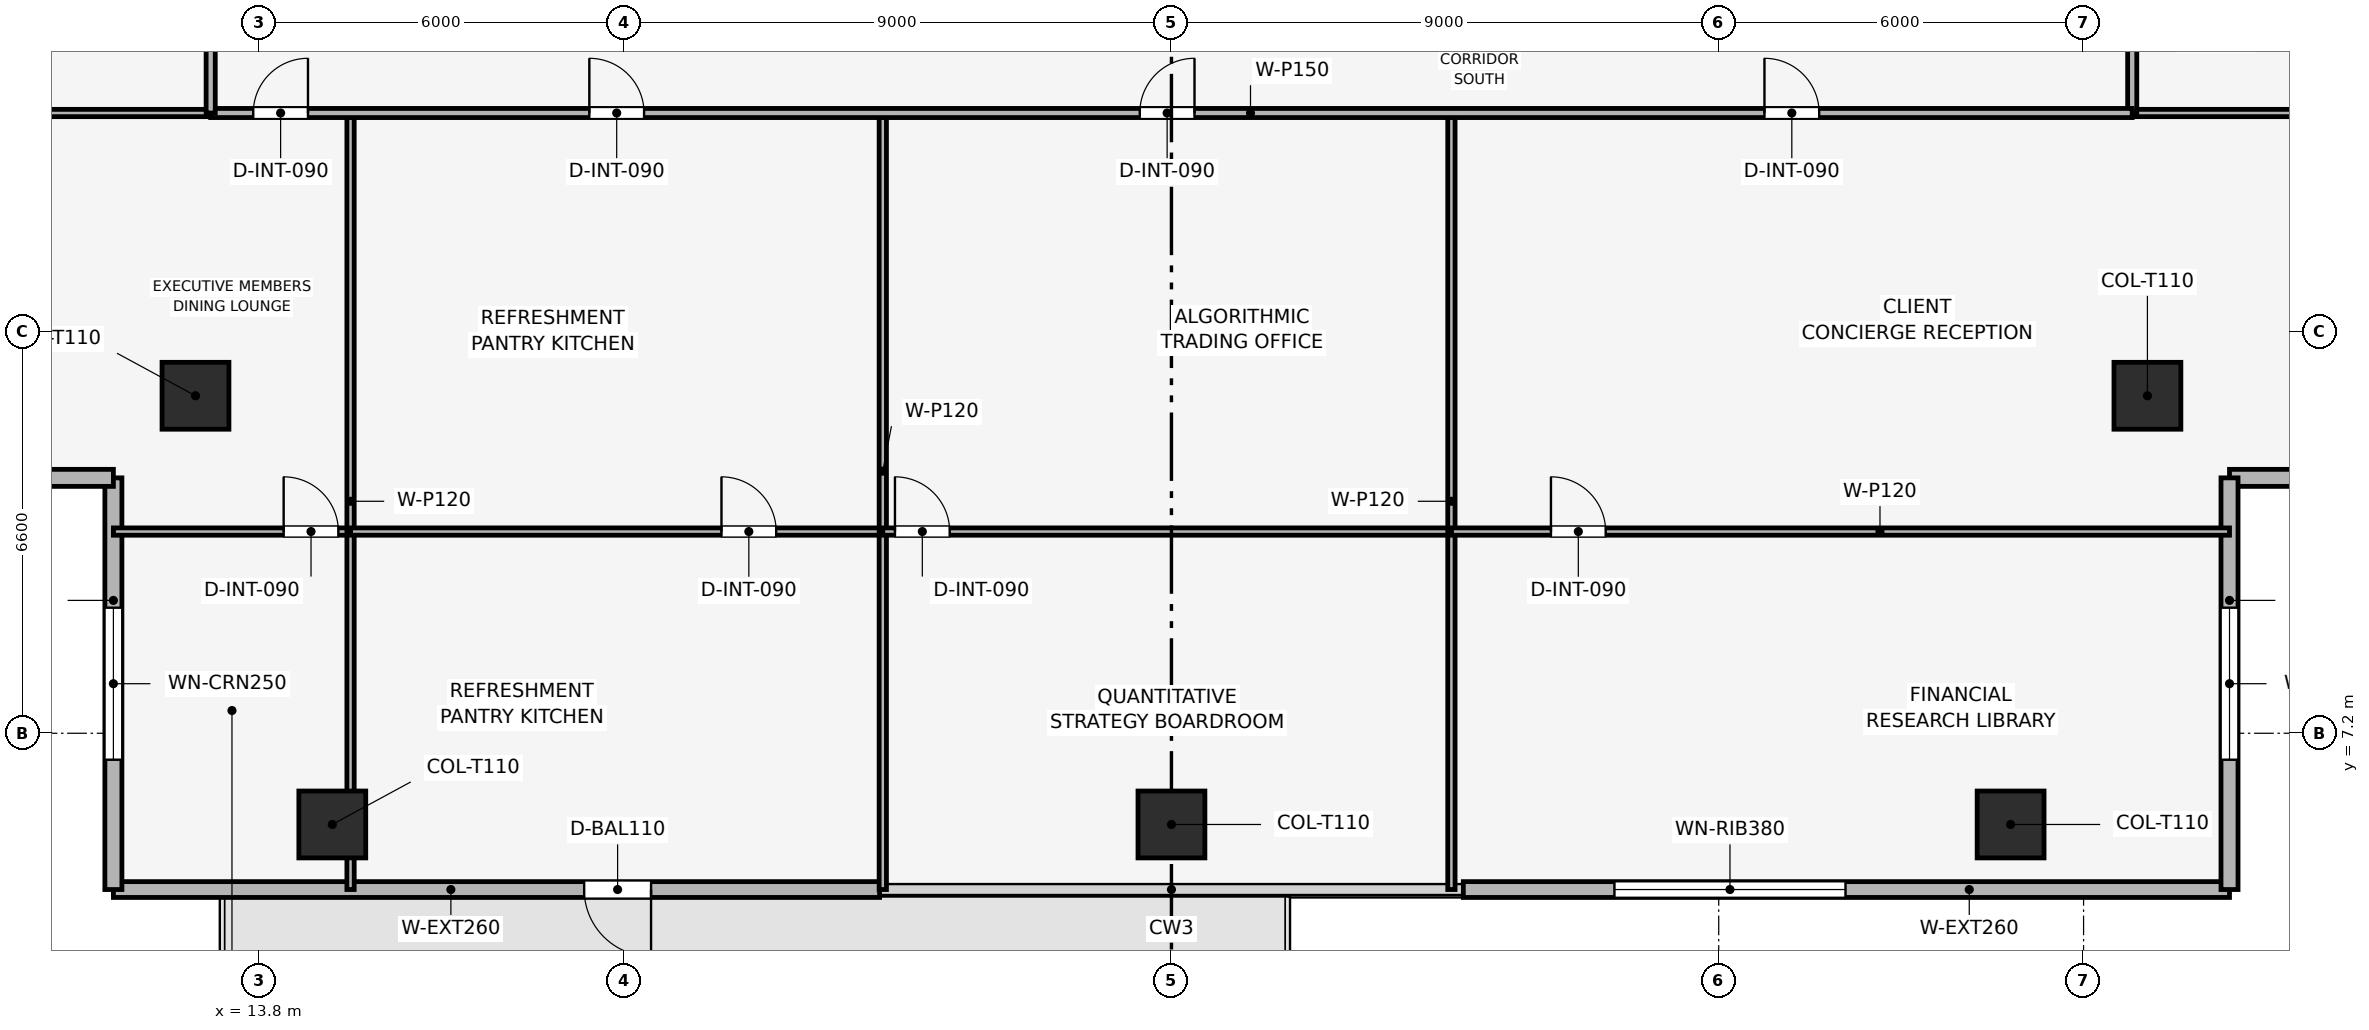
"""IFC4 building model, lengths in metres.
Left out: names, types, materials, properties, quantities, classifications, styles, units other than length and angle.
Written with IfcOpenShell. Run it as: python <this file> out.ifc"""

import sys

from ifc_helpers import new_model, si_unit, direction, frame, frame_2d, origin, origin_2d, place, context, subcontext, project, spatial, rectangle, extrude, element, fill, save


model = new_model("IFC4")
c1 = context("Model", 3, precision=1e-05, world=origin(), true_north=direction((0.0, 1.0)))
c2 = subcontext(c1, "Body", "Model", "MODEL_VIEW")
j1 = project(units=[si_unit("LENGTHUNIT", "METRE"), si_unit("PLANEANGLEUNIT", "RADIAN")], contexts=[c1])
p1 = place(None, origin())
s1 = spatial("IfcSite", under=j1, at=p1, CompositionType="ELEMENT")
p2 = place(p1, origin())
s2 = spatial("IfcBuilding", under=s1, at=p2, CompositionType="ELEMENT")
p3 = place(p2, frame((0.0, 0.0, 149.55)))
s3 = spatial("IfcBuildingStorey", under=s2, at=p3, CompositionType="ELEMENT", Elevation=149.55)
for number, where, z_axis, x_axis in (
    (1, (15.0, 5.7, 0.003), (0.0, 0.0, 1.0), (1.0, 0.0, 0.0)),
    (2, (28.8, 5.7, 0.003), (0.0, 0.0, 1.0), (1.0, 0.0, 0.0)),
    (3, (42.6, 5.7, 0.003), (0.0, 0.0, 1.0), (1.0, 0.0, 0.0)),
    (4, (12.75, 12.75, 0.003), (0.0, 0.0, 1.0), (1.0, 0.0, 0.0)),
    (5, (44.85, 12.75, 0.003), (0.0, 0.0, 1.0), (1.0, 0.0, 0.0)),
):
    element("IfcColumn", number, at=place(p3, frame(where, z_axis=z_axis, x_axis=x_axis)), inside=s3, PredefinedType="COLUMN", context=c2, shape_type="SweptSolid", body=[
        extrude(rectangle(XDim=1.1, YDim=1.1, at=origin_2d()), origin(), (0.0, 0.0, 1.0), 3.489),
    ])
p4 = place(p3, frame((46.2, 4.63, 0.0), z_axis=(0.0, 0.0, 1.0), x_axis=(-1.0, 0.0, 0.0)))
e6 = element("IfcWall", 6, at=p4, inside=s3, PredefinedType="SOLIDWALL", context=c2, shape_type="SweptSolid", body=[
    extrude(rectangle(XDim=12.6, YDim=0.26, at=frame_2d((6.3, 0.0))), origin(), (0.0, 0.0, 1.0), 3.495),
])
p5 = place(p4, frame((6.315, 0.0, 0.9)))
e7 = element("IfcOpeningElement", 7, at=p5, cuts=e6, PredefinedType="OPENING", context=c2, shape_type="SweptSolid", body=[
    extrude(rectangle(XDim=3.8, YDim=1.9, at=frame_2d((1.9, 0.95))), frame((0.0, 0.14, 0.0), z_axis=(0.0, -1.0, 0.0), x_axis=(1.0, 0.0, 0.0)), (0.0, 0.0, 1.0), 0.28),
])
p6 = place(p3, frame((24.0, 4.63, 0.0), z_axis=(0.0, 0.0, 1.0), x_axis=(-1.0, 0.0, 0.0)))
e8 = element("IfcWall", 8, at=p6, inside=s3, PredefinedType="SOLIDWALL", context=c2, shape_type="SweptSolid", body=[
    extrude(rectangle(XDim=12.6, YDim=0.26, at=frame_2d((6.3, 0.0))), origin(), (0.0, 0.0, 1.0), 3.495),
])
p7 = place(p6, frame((3.758, 0.0, 0.0)))
e9 = element("IfcOpeningElement", 9, at=p7, cuts=e8, PredefinedType="OPENING", context=c2, shape_type="SweptSolid", body=[
    extrude(rectangle(XDim=1.1, YDim=2.2, at=frame_2d((0.55, 1.1))), frame((0.0, 0.14, 0.0), z_axis=(0.0, -1.0, 0.0), x_axis=(1.0, 0.0, 0.0)), (0.0, 0.0, 1.0), 0.28),
])
p8 = place(p3, frame((11.4, 4.63, 0.0), z_axis=(0.0, 0.0, 1.0), x_axis=(0.0, 1.0, 0.0)))
e10 = element("IfcWall", 10, at=p8, inside=s3, PredefinedType="SOLIDWALL", context=c2, shape_type="SweptSolid", body=[
    extrude(rectangle(XDim=6.77, YDim=0.28, at=frame_2d((3.385, 0.0))), origin(), (0.0, 0.0, 1.0), 3.495),
])
p9 = place(p8, frame((2.135, 0.0, 0.9)))
e11 = element("IfcOpeningElement", 11, at=p9, cuts=e10, PredefinedType="OPENING", context=c2, shape_type="SweptSolid", body=[
    extrude(rectangle(XDim=2.5, YDim=1.9, at=frame_2d((1.25, 0.95))), frame((0.0, 0.15, 0.0), z_axis=(0.0, -1.0, 0.0), x_axis=(1.0, 0.0, 0.0)), (0.0, 0.0, 1.0), 0.3),
])
p10 = place(p3, frame((11.4, 11.4, 0.0), z_axis=(0.0, 0.0, 1.0), x_axis=(-1.0, 0.0, 0.0)))
e12 = element("IfcWall", 12, at=p10, inside=s3, PredefinedType="SOLIDWALL", context=c2, shape_type="SweptSolid", body=[
    extrude(rectangle(XDim=6.77, YDim=0.28, at=frame_2d((3.385, 0.0))), origin(), (0.0, 0.0, 1.0), 3.495),
])
p11 = place(p10, frame((2.135, 0.0, 0.9)))
e13 = element("IfcOpeningElement", 13, at=p11, cuts=e12, PredefinedType="OPENING", context=c2, shape_type="SweptSolid", body=[
    extrude(rectangle(XDim=2.5, YDim=1.9, at=frame_2d((1.25, 0.95))), frame((0.0, 0.15, 0.0), z_axis=(0.0, -1.0, 0.0), x_axis=(1.0, 0.0, 0.0)), (0.0, 0.0, 1.0), 0.3),
])
p12 = place(p3, frame((52.97, 11.4, 0.0), z_axis=(0.0, 0.0, 1.0), x_axis=(-1.0, 0.0, 0.0)))
e14 = element("IfcWall", 14, at=p12, inside=s3, PredefinedType="SOLIDWALL", context=c2, shape_type="SweptSolid", body=[
    extrude(rectangle(XDim=6.77, YDim=0.28, at=frame_2d((3.385, 0.0))), origin(), (0.0, 0.0, 1.0), 3.495),
])
p13 = place(p12, frame((2.135, 0.0, 0.9)))
e15 = element("IfcOpeningElement", 15, at=p13, cuts=e14, PredefinedType="OPENING", context=c2, shape_type="SweptSolid", body=[
    extrude(rectangle(XDim=2.5, YDim=1.9, at=frame_2d((1.25, 0.95))), frame((0.0, 0.15, 0.0), z_axis=(0.0, -1.0, 0.0), x_axis=(1.0, 0.0, 0.0)), (0.0, 0.0, 1.0), 0.3),
])
p14 = place(p3, frame((46.2, 11.4, 0.0), z_axis=(0.0, 0.0, 1.0), x_axis=(0.0, -1.0, 0.0)))
e16 = element("IfcWall", 16, at=p14, inside=s3, PredefinedType="SOLIDWALL", context=c2, shape_type="SweptSolid", body=[
    extrude(rectangle(XDim=6.77, YDim=0.28, at=frame_2d((3.385, 0.0))), origin(), (0.0, 0.0, 1.0), 3.495),
])
p15 = place(p14, frame((2.135, 0.0, 0.9)))
e17 = element("IfcOpeningElement", 17, at=p15, cuts=e16, PredefinedType="OPENING", context=c2, shape_type="SweptSolid", body=[
    extrude(rectangle(XDim=2.5, YDim=1.9, at=frame_2d((1.25, 0.95))), frame((0.0, 0.15, 0.0), z_axis=(0.0, -1.0, 0.0), x_axis=(1.0, 0.0, 0.0)), (0.0, 0.0, 1.0), 0.3),
])
p16 = place(p3, frame((11.4, 10.517, 0.0), z_axis=(0.0, 0.0, 1.0), x_axis=(1.0, 0.0, 0.0)))
e18 = element("IfcWall", 18, at=p16, inside=s3, PredefinedType="PARTITIONING", context=c2, shape_type="SweptSolid", body=[
    extrude(rectangle(XDim=3.9, YDim=0.12, at=frame_2d((1.95, 0.0))), origin(), (0.0, 0.0, 1.0), 2.98),
])
p17 = place(p16, frame((2.8, 0.0, 0.0)))
e19 = element("IfcOpeningElement", 19, at=p17, cuts=e18, PredefinedType="OPENING", context=c2, shape_type="SweptSolid", body=[
    extrude(rectangle(XDim=0.9, YDim=2.1, at=frame_2d((0.45, 1.05))), frame((0.0, 0.07, 0.0), z_axis=(0.0, -1.0, 0.0), x_axis=(1.0, 0.0, 0.0)), (0.0, 0.0, 1.0), 0.14),
])
p18 = place(p3, frame((15.3, 4.63, 0.0), z_axis=(0.0, 0.0, 1.0), x_axis=(0.0, 1.0, 0.0)))
e20 = element("IfcWall", 20, at=p18, inside=s3, PredefinedType="PARTITIONING", context=c2, shape_type="SweptSolid", body=[
    extrude(rectangle(XDim=12.77, YDim=0.12, at=frame_2d((6.385, 0.0))), origin(), (0.0, 0.0, 1.0), 2.98),
])
p19 = place(p3, frame((15.3, 10.517, 0.0), z_axis=(0.0, 0.0, 1.0), x_axis=(1.0, 0.0, 0.0)))
e21 = element("IfcWall", 21, at=p19, inside=s3, PredefinedType="PARTITIONING", context=c2, shape_type="SweptSolid", body=[
    extrude(rectangle(XDim=8.753, YDim=0.12, at=frame_2d((4.376, 0.0))), origin(), (0.0, 0.0, 1.0), 3.03),
])
p20 = place(p19, frame((6.1, 0.0, 0.0)))
e22 = element("IfcOpeningElement", 22, at=p20, cuts=e21, PredefinedType="OPENING", context=c2, shape_type="SweptSolid", body=[
    extrude(rectangle(XDim=0.9, YDim=2.1, at=frame_2d((0.45, 1.05))), frame((0.0, 0.07, 0.0), z_axis=(0.0, -1.0, 0.0), x_axis=(1.0, 0.0, 0.0)), (0.0, 0.0, 1.0), 0.14),
])
p21 = place(p3, frame((24.053, 4.63, 0.0), z_axis=(0.0, 0.0, 1.0), x_axis=(0.0, 1.0, 0.0)))
e23 = element("IfcWall", 23, at=p21, inside=s3, PredefinedType="PARTITIONING", context=c2, shape_type="SweptSolid", body=[
    extrude(rectangle(XDim=12.77, YDim=0.12, at=frame_2d((6.385, 0.0))), origin(), (0.0, 0.0, 1.0), 2.98),
])
p22 = place(p3, frame((24.053, 10.517, 0.0), z_axis=(0.0, 0.0, 1.0), x_axis=(1.0, 0.0, 0.0)))
e24 = element("IfcWall", 24, at=p22, inside=s3, PredefinedType="PARTITIONING", context=c2, shape_type="SweptSolid", body=[
    extrude(rectangle(XDim=9.351, YDim=0.12, at=frame_2d((4.676, 0.0))), origin(), (0.0, 0.0, 1.0), 3.03),
])
p23 = place(p22, frame((0.2, 0.0, 0.0)))
e25 = element("IfcOpeningElement", 25, at=p23, cuts=e24, PredefinedType="OPENING", context=c2, shape_type="SweptSolid", body=[
    extrude(rectangle(XDim=0.9, YDim=2.1, at=frame_2d((0.45, 1.05))), frame((0.0, 0.07, 0.0), z_axis=(0.0, -1.0, 0.0), x_axis=(1.0, 0.0, 0.0)), (0.0, 0.0, 1.0), 0.14),
])
p24 = place(p3, frame((33.404, 4.63, 0.0), z_axis=(0.0, 0.0, 1.0), x_axis=(0.0, 1.0, 0.0)))
e26 = element("IfcWall", 26, at=p24, inside=s3, PredefinedType="PARTITIONING", context=c2, shape_type="SweptSolid", body=[
    extrude(rectangle(XDim=12.77, YDim=0.12, at=frame_2d((6.385, 0.0))), origin(), (0.0, 0.0, 1.0), 2.98),
])
p25 = place(p3, frame((33.404, 10.517, 0.0), z_axis=(0.0, 0.0, 1.0), x_axis=(1.0, 0.0, 0.0)))
e27 = element("IfcWall", 27, at=p25, inside=s3, PredefinedType="PARTITIONING", context=c2, shape_type="SweptSolid", body=[
    extrude(rectangle(XDim=12.796, YDim=0.12, at=frame_2d((6.398, 0.0))), origin(), (0.0, 0.0, 1.0), 2.98),
])
p26 = place(p25, frame((1.637, 0.0, 0.0)))
e28 = element("IfcOpeningElement", 28, at=p26, cuts=e27, PredefinedType="OPENING", context=c2, shape_type="SweptSolid", body=[
    extrude(rectangle(XDim=0.9, YDim=2.1, at=frame_2d((0.45, 1.05))), frame((0.0, 0.07, 0.0), z_axis=(0.0, -1.0, 0.0), x_axis=(1.0, 0.0, 0.0)), (0.0, 0.0, 1.0), 0.14),
])
p27 = place(p3, frame((4.63, 17.4, 0.0), z_axis=(0.0, 0.0, 1.0), x_axis=(1.0, 0.0, 0.0)))
e29 = element("IfcWall", 29, at=p27, inside=s3, PredefinedType="PARTITIONING", context=c2, shape_type="SweptSolid", body=[
    extrude(rectangle(XDim=8.37, YDim=0.12, at=frame_2d((4.185, 0.0))), origin(), (0.0, 0.0, 1.0), 2.98),
])
p28 = place(p3, frame((44.6, 17.4, 0.0), z_axis=(0.0, 0.0, 1.0), x_axis=(1.0, 0.0, 0.0)))
e30 = element("IfcWall", 30, at=p28, inside=s3, PredefinedType="PARTITIONING", context=c2, shape_type="SweptSolid", body=[
    extrude(rectangle(XDim=8.37, YDim=0.12, at=frame_2d((4.185, 0.0))), origin(), (0.0, 0.0, 1.0), 2.98),
])
p29 = place(p3, frame((44.6, 17.4, 0.0), z_axis=(0.0, 0.0, 1.0), x_axis=(0.0, 1.0, 0.0)))
e31 = element("IfcWall", 31, at=p29, inside=s3, PredefinedType="PARTITIONING", context=c2, shape_type="SweptSolid", body=[
    extrude(rectangle(XDim=2.4, YDim=0.15, at=frame_2d((1.2, 0.0))), origin(), (0.0, 0.0, 1.0), 3.495),
])
p30 = place(p3, frame((13.0, 17.4, 0.0), z_axis=(0.0, 0.0, 1.0), x_axis=(1.0, 0.0, 0.0)))
e32 = element("IfcWall", 32, at=p30, inside=s3, PredefinedType="PARTITIONING", context=c2, shape_type="SweptSolid", body=[
    extrude(rectangle(XDim=31.6, YDim=0.15, at=frame_2d((15.8, 0.0))), origin(), (0.0, 0.0, 1.0), 3.03),
])
p31 = place(p30, frame((0.7, 0.0, 0.0)))
e33 = element("IfcOpeningElement", 33, at=p31, cuts=e32, PredefinedType="OPENING", context=c2, shape_type="SweptSolid", body=[
    extrude(rectangle(XDim=0.9, YDim=2.1, at=frame_2d((0.45, 1.05))), frame((0.0, 0.085, 0.0), z_axis=(0.0, -1.0, 0.0), x_axis=(1.0, 0.0, 0.0)), (0.0, 0.0, 1.0), 0.17),
])
p32 = place(p30, frame((6.227, 0.0, 0.0)))
e34 = element("IfcOpeningElement", 34, at=p32, cuts=e32, PredefinedType="OPENING", context=c2, shape_type="SweptSolid", body=[
    extrude(rectangle(XDim=0.9, YDim=2.1, at=frame_2d((0.45, 1.05))), frame((0.0, 0.085, 0.0), z_axis=(0.0, -1.0, 0.0), x_axis=(1.0, 0.0, 0.0)), (0.0, 0.0, 1.0), 0.17),
])
p33 = place(p30, frame((15.279, 0.0, 0.0)))
e35 = element("IfcOpeningElement", 35, at=p33, cuts=e32, PredefinedType="OPENING", context=c2, shape_type="SweptSolid", body=[
    extrude(rectangle(XDim=0.9, YDim=2.1, at=frame_2d((0.45, 1.05))), frame((0.0, 0.085, 0.0), z_axis=(0.0, -1.0, 0.0), x_axis=(1.0, 0.0, 0.0)), (0.0, 0.0, 1.0), 0.17),
])
p34 = place(p30, frame((25.552, 0.0, 0.0)))
e36 = element("IfcOpeningElement", 36, at=p34, cuts=e32, PredefinedType="OPENING", context=c2, shape_type="SweptSolid", body=[
    extrude(rectangle(XDim=0.9, YDim=2.1, at=frame_2d((0.45, 1.05))), frame((0.0, 0.085, 0.0), z_axis=(0.0, -1.0, 0.0), x_axis=(1.0, 0.0, 0.0)), (0.0, 0.0, 1.0), 0.17),
])
p35 = place(p3, frame((13.0, 17.4, 0.0), z_axis=(0.0, 0.0, 1.0), x_axis=(0.0, 1.0, 0.0)))
e37 = element("IfcWall", 37, at=p35, inside=s3, PredefinedType="PARTITIONING", context=c2, shape_type="SweptSolid", body=[
    extrude(rectangle(XDim=22.8, YDim=0.15, at=frame_2d((11.4, 0.0))), origin(), (0.0, 0.0, 1.0), 3.03),
])
p36 = place(p35, frame((10.95, 0.0, 0.0)))
e38 = element("IfcOpeningElement", 38, at=p36, cuts=e37, PredefinedType="OPENING", context=c2, shape_type="SweptSolid", body=[
    extrude(rectangle(XDim=0.9, YDim=2.1, at=frame_2d((0.45, 1.05))), frame((0.0, 0.085, 0.0), z_axis=(0.0, -1.0, 0.0), x_axis=(1.0, 0.0, 0.0)), (0.0, 0.0, 1.0), 0.17),
])
p37 = place(p7, origin())
e39 = element("IfcDoor", 39, at=p37, inside=s3, OperationType="SINGLE_SWING_LEFT", PredefinedType="DOOR", context=c2, shape_type="SweptSolid", body=[
    extrude(rectangle(XDim=1.1, YDim=2.2, at=frame_2d((0.55, 1.1))), frame((0.0, 0.025, 0.0), z_axis=(0.0, -1.0, 0.0), x_axis=(1.0, 0.0, 0.0)), (0.0, 0.0, 1.0), 0.05),
])
fill(e9, e39)
p38 = place(p5, origin())
e40 = element("IfcWindow", 40, at=p38, inside=s3, PartitioningType="SINGLE_PANEL", PredefinedType="WINDOW", context=c2, shape_type="SweptSolid", body=[
    extrude(rectangle(XDim=3.8, YDim=1.9, at=frame_2d((1.9, 0.95))), frame((0.0, 0.03, 0.0), z_axis=(0.0, -1.0, 0.0), x_axis=(1.0, 0.0, 0.0)), (0.0, 0.0, 1.0), 0.06),
])
fill(e7, e40)
p39 = place(p9, origin())
e41 = element("IfcWindow", 41, at=p39, inside=s3, PartitioningType="SINGLE_PANEL", PredefinedType="WINDOW", context=c2, shape_type="SweptSolid", body=[
    extrude(rectangle(XDim=2.5, YDim=1.9, at=frame_2d((1.25, 0.95))), frame((0.0, 0.03, 0.0), z_axis=(0.0, -1.0, 0.0), x_axis=(1.0, 0.0, 0.0)), (0.0, 0.0, 1.0), 0.06),
])
fill(e11, e41)
p40 = place(p15, origin())
e42 = element("IfcWindow", 42, at=p40, inside=s3, PartitioningType="SINGLE_PANEL", PredefinedType="WINDOW", context=c2, shape_type="SweptSolid", body=[
    extrude(rectangle(XDim=2.5, YDim=1.9, at=frame_2d((1.25, 0.95))), frame((0.0, 0.03, 0.0), z_axis=(0.0, -1.0, 0.0), x_axis=(1.0, 0.0, 0.0)), (0.0, 0.0, 1.0), 0.06),
])
fill(e17, e42)
p41 = place(p17, origin())
e43 = element("IfcDoor", 43, at=p41, inside=s3, OperationType="SINGLE_SWING_LEFT", PredefinedType="DOOR", context=c2, shape_type="SweptSolid", body=[
    extrude(rectangle(XDim=0.9, YDim=2.1, at=frame_2d((0.45, 1.05))), frame((0.0, 0.025, 0.0), z_axis=(0.0, -1.0, 0.0), x_axis=(1.0, 0.0, 0.0)), (0.0, 0.0, 1.0), 0.05),
])
fill(e19, e43)
p42 = place(p20, origin())
e44 = element("IfcDoor", 44, at=p42, inside=s3, OperationType="SINGLE_SWING_LEFT", PredefinedType="DOOR", context=c2, shape_type="SweptSolid", body=[
    extrude(rectangle(XDim=0.9, YDim=2.1, at=frame_2d((0.45, 1.05))), frame((0.0, 0.025, 0.0), z_axis=(0.0, -1.0, 0.0), x_axis=(1.0, 0.0, 0.0)), (0.0, 0.0, 1.0), 0.05),
])
fill(e22, e44)
p43 = place(p23, origin())
e45 = element("IfcDoor", 45, at=p43, inside=s3, OperationType="SINGLE_SWING_LEFT", PredefinedType="DOOR", context=c2, shape_type="SweptSolid", body=[
    extrude(rectangle(XDim=0.9, YDim=2.1, at=frame_2d((0.45, 1.05))), frame((0.0, 0.025, 0.0), z_axis=(0.0, -1.0, 0.0), x_axis=(1.0, 0.0, 0.0)), (0.0, 0.0, 1.0), 0.05),
])
fill(e25, e45)
p44 = place(p26, origin())
e46 = element("IfcDoor", 46, at=p44, inside=s3, OperationType="SINGLE_SWING_LEFT", PredefinedType="DOOR", context=c2, shape_type="SweptSolid", body=[
    extrude(rectangle(XDim=0.9, YDim=2.1, at=frame_2d((0.45, 1.05))), frame((0.0, 0.025, 0.0), z_axis=(0.0, -1.0, 0.0), x_axis=(1.0, 0.0, 0.0)), (0.0, 0.0, 1.0), 0.05),
])
fill(e28, e46)
p45 = place(p31, origin())
e47 = element("IfcDoor", 47, at=p45, inside=s3, OperationType="SINGLE_SWING_RIGHT", PredefinedType="DOOR", context=c2, shape_type="SweptSolid", body=[
    extrude(rectangle(XDim=0.9, YDim=2.1, at=frame_2d((0.45, 1.05))), frame((0.0, 0.025, 0.0), z_axis=(0.0, -1.0, 0.0), x_axis=(1.0, 0.0, 0.0)), (0.0, 0.0, 1.0), 0.05),
])
fill(e33, e47)
p46 = place(p32, origin())
e48 = element("IfcDoor", 48, at=p46, inside=s3, OperationType="SINGLE_SWING_LEFT", PredefinedType="DOOR", context=c2, shape_type="SweptSolid", body=[
    extrude(rectangle(XDim=0.9, YDim=2.1, at=frame_2d((0.45, 1.05))), frame((0.0, 0.025, 0.0), z_axis=(0.0, -1.0, 0.0), x_axis=(1.0, 0.0, 0.0)), (0.0, 0.0, 1.0), 0.05),
])
fill(e34, e48)
p47 = place(p33, origin())
e49 = element("IfcDoor", 49, at=p47, inside=s3, OperationType="SINGLE_SWING_RIGHT", PredefinedType="DOOR", context=c2, shape_type="SweptSolid", body=[
    extrude(rectangle(XDim=0.9, YDim=2.1, at=frame_2d((0.45, 1.05))), frame((0.0, 0.025, 0.0), z_axis=(0.0, -1.0, 0.0), x_axis=(1.0, 0.0, 0.0)), (0.0, 0.0, 1.0), 0.05),
])
fill(e35, e49)
p48 = place(p34, origin())
e50 = element("IfcDoor", 50, at=p48, inside=s3, OperationType="SINGLE_SWING_LEFT", PredefinedType="DOOR", context=c2, shape_type="SweptSolid", body=[
    extrude(rectangle(XDim=0.9, YDim=2.1, at=frame_2d((0.45, 1.05))), frame((0.0, 0.025, 0.0), z_axis=(0.0, -1.0, 0.0), x_axis=(1.0, 0.0, 0.0)), (0.0, 0.0, 1.0), 0.05),
])
fill(e36, e50)
save(model, sys.argv[1])
